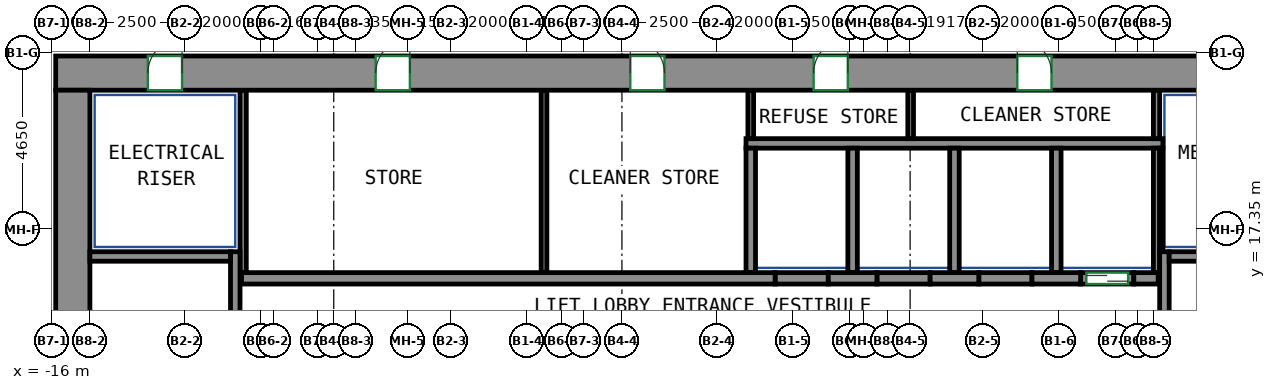
"""IFC4 building model, lengths in metres.
Left out: names, types, materials, properties, quantities, classifications, styles, units other than length and angle.
Written with IfcOpenShell. Run it as: python <this file> out.ifc"""

import sys

from ifc_helpers import new_model, si_unit, direction, frame, frame_2d, origin, place, context, subcontext, project, spatial, rectangle, extrude, source, transform, mapped, element, fill, save


model = new_model("IFC4")
c1 = context("Model", 3, precision=1e-05, world=origin(), true_north=direction((0.0, 1.0)))
c2 = subcontext(c1, "Body", "Model", "MODEL_VIEW")
j1 = project(units=[si_unit("LENGTHUNIT", "METRE"), si_unit("PLANEANGLEUNIT", "RADIAN")], contexts=[c1])
p1 = place(None, origin())
s1 = spatial("IfcSite", under=j1, at=p1, CompositionType="ELEMENT")
p2 = place(p1, origin())
s2 = spatial("IfcBuilding", under=s1, at=p2, CompositionType="ELEMENT")
p3 = place(p2, frame((0.0, 0.0, 178.7)))
s3 = spatial("IfcBuildingStorey", under=s2, at=p3, CompositionType="ELEMENT", Elevation=178.7)
m1 = source(origin(), c2, "Body", "SweptSolid", [
    extrude(rectangle(XDim=33.9, YDim=0.9, at=frame_2d((16.95, 0.0))), origin(), (0.0, 0.0, 1.0), 3.12),
])
p4 = place(p3, frame((-15.9, 21.45, 0.0), z_axis=(0.0, 0.0, 1.0), x_axis=(1.0, 0.0, 0.0)))
e1 = element("IfcWall", 1, at=p4, inside=s3, PredefinedType="SHEAR", context=c2, shape_type="MappedRepresentation", body=[
    mapped(m1, transform((0.0, 0.0, 0.0))),
])
p5 = place(p4, frame((8.42, 0.0, 0.0)))
e2 = element("IfcOpeningElement", 2, at=p5, cuts=e1, PredefinedType="OPENING", context=c2, shape_type="SweptSolid", body=[
    extrude(rectangle(XDim=0.9, YDim=2.1, at=frame_2d((0.45, 1.05))), frame((0.0, 0.46, 0.0), z_axis=(0.0, -1.0, 0.0), x_axis=(1.0, 0.0, 0.0)), (0.0, 0.0, 1.0), 0.92),
])
p6 = place(p4, frame((15.12, 0.0, 0.0)))
e3 = element("IfcOpeningElement", 3, at=p6, cuts=e1, PredefinedType="OPENING", context=c2, shape_type="SweptSolid", body=[
    extrude(rectangle(XDim=0.9, YDim=2.1, at=frame_2d((0.45, 1.05))), frame((0.0, 0.46, 0.0), z_axis=(0.0, -1.0, 0.0), x_axis=(1.0, 0.0, 0.0)), (0.0, 0.0, 1.0), 0.92),
])
p7 = place(p4, frame((19.944, 0.0, 0.0)))
e4 = element("IfcOpeningElement", 4, at=p7, cuts=e1, PredefinedType="OPENING", context=c2, shape_type="SweptSolid", body=[
    extrude(rectangle(XDim=0.9, YDim=2.1, at=frame_2d((0.45, 1.05))), frame((0.0, 0.46, 0.0), z_axis=(0.0, -1.0, 0.0), x_axis=(1.0, 0.0, 0.0)), (0.0, 0.0, 1.0), 0.92),
])
p8 = place(p4, frame((25.304, 0.0, 0.0)))
e5 = element("IfcOpeningElement", 5, at=p8, cuts=e1, PredefinedType="OPENING", context=c2, shape_type="SweptSolid", body=[
    extrude(rectangle(XDim=0.9, YDim=2.1, at=frame_2d((0.45, 1.05))), frame((0.0, 0.46, 0.0), z_axis=(0.0, -1.0, 0.0), x_axis=(1.0, 0.0, 0.0)), (0.0, 0.0, 1.0), 0.92),
])
p9 = place(p4, frame((2.425, 0.0, 0.0)))
e6 = element("IfcOpeningElement", 6, at=p9, cuts=e1, PredefinedType="OPENING", context=c2, shape_type="SweptSolid", body=[
    extrude(rectangle(XDim=0.9, YDim=2.1, at=frame_2d((0.45, 1.05))), frame((0.0, 0.46, 0.0), z_axis=(0.0, -1.0, 0.0), x_axis=(1.0, 0.0, 0.0)), (0.0, 0.0, 1.0), 0.92),
])
p10 = place(p4, frame((30.575, 0.0, 0.0)))
e7 = element("IfcOpeningElement", 7, at=p10, cuts=e1, PredefinedType="OPENING", context=c2, shape_type="SweptSolid", body=[
    extrude(rectangle(XDim=0.9, YDim=2.1, at=frame_2d((0.45, 1.05))), frame((0.0, 0.46, 0.0), z_axis=(0.0, -1.0, 0.0), x_axis=(1.0, 0.0, 0.0)), (0.0, 0.0, 1.0), 0.92),
])
m2 = source(origin(), c2, "Body", "SweptSolid", [
    extrude(rectangle(XDim=12.0, YDim=0.9, at=frame_2d((6.0, 0.0))), origin(), (0.0, 0.0, 1.0), 3.12),
])
p11 = place(p3, frame((-15.45, 9.0, 0.0), z_axis=(0.0, 0.0, 1.0), x_axis=(0.0, 1.0, 0.0)))
e8 = element("IfcWall", 8, at=p11, inside=s3, PredefinedType="SHEAR", context=c2, shape_type="MappedRepresentation", body=[
    mapped(m2, transform((0.0, 0.0, 0.0))),
])
m3 = source(origin(), c2, "Body", "SweptSolid", [
    extrude(rectangle(XDim=7.75, YDim=0.25, at=frame_2d((3.875, 0.0))), origin(), (0.0, 0.0, 1.0), 3.12),
])
p12 = place(p3, frame((-11.175, 9.0, 0.0), z_axis=(0.0, 0.0, 1.0), x_axis=(0.0, 1.0, 0.0)))
e9 = element("IfcWall", 9, at=p12, inside=s3, PredefinedType="SHEAR", context=c2, shape_type="MappedRepresentation", body=[
    mapped(m3, transform((0.0, 0.0, 0.0))),
])
m4 = source(origin(), c2, "Body", "SweptSolid", [
    extrude(rectangle(XDim=3.7, YDim=0.25, at=frame_2d((1.85, 0.0))), origin(), (0.0, 0.0, 1.0), 3.12),
])
p13 = place(p3, frame((-15.0, 16.625, 0.0), z_axis=(0.0, 0.0, 1.0), x_axis=(1.0, 0.0, 0.0)))
e10 = element("IfcWall", 10, at=p13, inside=s3, PredefinedType="SHEAR", context=c2, shape_type="MappedRepresentation", body=[
    mapped(m4, transform((0.0, 0.0, 0.0))),
])
p14 = place(p3, frame((13.275, 9.0, 0.0), z_axis=(0.0, 0.0, 1.0), x_axis=(0.0, 1.0, 0.0)))
e11 = element("IfcWall", 11, at=p14, inside=s3, PredefinedType="SHEAR", context=c2, shape_type="MappedRepresentation", body=[
    mapped(m3, transform((0.0, 0.0, 0.0))),
])
m5 = source(origin(), c2, "Body", "SweptSolid", [
    extrude(rectangle(XDim=3.7, YDim=0.25, at=frame_2d((1.85, 0.0))), origin(), (0.0, 0.0, 1.0), 3.12),
])
p15 = place(p3, frame((13.4, 16.625, 0.0), z_axis=(0.0, 0.0, 1.0), x_axis=(1.0, 0.0, 0.0)))
e12 = element("IfcWall", 12, at=p15, inside=s3, PredefinedType="SHEAR", context=c2, shape_type="MappedRepresentation", body=[
    mapped(m5, transform((0.0, 0.0, 0.0))),
])
m6 = source(origin(), c2, "Body", "SweptSolid", [
    extrude(rectangle(XDim=14.04, YDim=0.3, at=frame_2d((7.02, 0.0))), origin(), (0.0, 0.0, 1.0), 3.12),
])
p16 = place(p3, frame((-11.01, 16.05, 0.0), z_axis=(0.0, 0.0, 1.0), x_axis=(1.0, 0.0, 0.0)))
e13 = element("IfcWall", 13, at=p16, inside=s3, PredefinedType="SHEAR", context=c2, shape_type="MappedRepresentation", body=[
    mapped(m6, transform((0.0, 0.0, 0.0))),
])
m7 = source(origin(), c2, "Body", "SweptSolid", [
    extrude(rectangle(XDim=1.28, YDim=0.3, at=frame_2d((0.64, 0.0))), origin(), (0.0, 0.0, 1.0), 3.12),
])
p17 = place(p3, frame((4.43, 16.05, 0.0), z_axis=(0.0, 0.0, 1.0), x_axis=(1.0, 0.0, 0.0)))
e14 = element("IfcWall", 14, at=p17, inside=s3, PredefinedType="SHEAR", context=c2, shape_type="MappedRepresentation", body=[
    mapped(m7, transform((0.0, 0.0, 0.0))),
])
m8 = source(origin(), c2, "Body", "SweptSolid", [
    extrude(rectangle(XDim=1.28, YDim=0.3, at=frame_2d((0.64, 0.0))), origin(), (0.0, 0.0, 1.0), 3.12),
])
p18 = place(p3, frame((7.11, 16.05, 0.0), z_axis=(0.0, 0.0, 1.0), x_axis=(1.0, 0.0, 0.0)))
e15 = element("IfcWall", 15, at=p18, inside=s3, PredefinedType="SHEAR", context=c2, shape_type="MappedRepresentation", body=[
    mapped(m8, transform((0.0, 0.0, 0.0))),
])
p19 = place(p3, frame((9.79, 16.05, 0.0), z_axis=(0.0, 0.0, 1.0), x_axis=(1.0, 0.0, 0.0)))
e16 = element("IfcWall", 16, at=p19, inside=s3, PredefinedType="SHEAR", context=c2, shape_type="MappedRepresentation", body=[
    mapped(m7, transform((0.0, 0.0, 0.0))),
])
m9 = source(origin(), c2, "Body", "SweptSolid", [
    extrude(rectangle(XDim=0.64, YDim=0.3, at=frame_2d((0.32, 0.0))), origin(), (0.0, 0.0, 1.0), 3.12),
])
p20 = place(p3, frame((12.47, 16.05, 0.0), z_axis=(0.0, 0.0, 1.0), x_axis=(1.0, 0.0, 0.0)))
e17 = element("IfcWall", 17, at=p20, inside=s3, PredefinedType="SHEAR", context=c2, shape_type="MappedRepresentation", body=[
    mapped(m9, transform((0.0, 0.0, 0.0))),
])
m10 = source(origin(), c2, "Body", "SweptSolid", [
    extrude(rectangle(XDim=1.4, YDim=0.3, at=frame_2d((0.7, 0.0))), origin(), (0.0, 0.0, 1.0), 3.12),
])
p21 = place(p3, frame((11.07, 16.05, 0.0), z_axis=(0.0, 0.0, 1.0), x_axis=(1.0, 0.0, 0.0)))
e18 = element("IfcWall", 18, at=p21, inside=s3, PredefinedType="PARTITIONING", context=c2, shape_type="MappedRepresentation", body=[
    mapped(m10, transform((0.0, 0.0, 0.0))),
])
p22 = place(p21, frame((0.15, 0.0, 0.0)))
e19 = element("IfcOpeningElement", 19, at=p22, cuts=e18, PredefinedType="OPENING", context=c2, shape_type="SweptSolid", body=[
    extrude(rectangle(XDim=1.1, YDim=2.1, at=frame_2d((0.55, 1.05))), frame((0.0, 0.16, 0.0), z_axis=(0.0, -1.0, 0.0), x_axis=(1.0, 0.0, 0.0)), (0.0, 0.0, 1.0), 0.32),
])
p23 = place(p3, frame((3.03, 16.05, 0.0), z_axis=(0.0, 0.0, 1.0), x_axis=(1.0, 0.0, 0.0)))
e20 = element("IfcWall", 20, at=p23, inside=s3, PredefinedType="PARTITIONING", context=c2, shape_type="MappedRepresentation", body=[
    mapped(m10, transform((0.0, 0.0, 0.0))),
])
m11 = source(origin(), c2, "Body", "SweptSolid", [
    extrude(rectangle(XDim=1.4, YDim=0.3, at=frame_2d((0.7, 0.0))), origin(), (0.0, 0.0, 1.0), 3.12),
])
for number, where, z_axis, x_axis in (
    (21, (5.71, 16.05, 0.0), (0.0, 0.0, 1.0), (1.0, 0.0, 0.0)),
    (22, (8.39, 16.05, 0.0), (0.0, 0.0, 1.0), (1.0, 0.0, 0.0)),
):
    element("IfcWall", number, at=place(p3, frame(where, z_axis=z_axis, x_axis=x_axis)), inside=s3, PredefinedType="PARTITIONING", context=c2, shape_type="MappedRepresentation", body=[
        mapped(m11, transform((0.0, 0.0, 0.0))),
    ])
m12 = source(origin(), c2, "Body", "SweptSolid", [
    extrude(rectangle(XDim=10.97, YDim=0.25, at=frame_2d((5.485, 0.0))), origin(), (0.0, 0.0, 1.0), 3.12),
])
p24 = place(p3, frame((2.265, 19.6, 0.0), z_axis=(0.0, 0.0, 1.0), x_axis=(1.0, 0.0, 0.0)))
e23 = element("IfcWall", 23, at=p24, inside=s3, PredefinedType="PARTITIONING", context=c2, shape_type="MappedRepresentation", body=[
    mapped(m12, transform((0.0, 0.0, 0.0))),
])
m13 = source(origin(), c2, "Body", "SweptSolid", [
    extrude(rectangle(XDim=3.275, YDim=0.165, at=frame_2d((1.638, 0.0))), origin(), (0.0, 0.0, 1.0), 3.12),
])
p25 = place(p3, frame((13.067, 16.2, 0.0), z_axis=(0.0, 0.0, 1.0), x_axis=(0.0, 1.0, 0.0)))
e24 = element("IfcWall", 24, at=p25, inside=s3, PredefinedType="PARTITIONING", context=c2, shape_type="MappedRepresentation", body=[
    mapped(m13, transform((0.0, 0.0, 0.0))),
])
m14 = source(origin(), c2, "Body", "SweptSolid", [
    extrude(rectangle(XDim=1.275, YDim=0.165, at=frame_2d((0.637, 0.0))), origin(), (0.0, 0.0, 1.0), 3.12),
])
p26 = place(p3, frame((13.067, 19.725, 0.0), z_axis=(0.0, 0.0, 1.0), x_axis=(0.0, 1.0, 0.0)))
e25 = element("IfcWall", 25, at=p26, inside=s3, PredefinedType="PARTITIONING", context=c2, shape_type="MappedRepresentation", body=[
    mapped(m14, transform((0.0, 0.0, 0.0))),
])
m15 = source(origin(), c2, "Body", "SweptSolid", [
    extrude(rectangle(XDim=4.8, YDim=0.165, at=frame_2d((2.4, 0.0))), origin(), (0.0, 0.0, 1.0), 3.12),
])
p27 = place(p3, frame((-10.968, 16.2, 0.0), z_axis=(0.0, 0.0, 1.0), x_axis=(0.0, 1.0, 0.0)))
e26 = element("IfcWall", 26, at=p27, inside=s3, PredefinedType="PARTITIONING", context=c2, shape_type="MappedRepresentation", body=[
    mapped(m15, transform((0.0, 0.0, 0.0))),
])
m16 = source(origin(), c2, "Body", "SweptSolid", [
    extrude(rectangle(XDim=3.275, YDim=0.25, at=frame_2d((1.638, 0.0))), origin(), (0.0, 0.0, 1.0), 3.12),
])
p28 = place(p3, frame((10.43, 16.2, 0.0), z_axis=(0.0, 0.0, 1.0), x_axis=(0.0, 1.0, 0.0)))
e27 = element("IfcWall", 27, at=p28, inside=s3, PredefinedType="PARTITIONING", context=c2, shape_type="MappedRepresentation", body=[
    mapped(m16, transform((0.0, 0.0, 0.0))),
])
m17 = source(origin(), c2, "Body", "SweptSolid", [
    extrude(rectangle(XDim=2.725, YDim=0.085, at=frame_2d((1.363, 0.0))), origin(), (0.0, 0.0, 1.0), 3.12),
])
p29 = place(p3, frame((13.192, 16.75, 0.0), z_axis=(0.0, 0.0, 1.0), x_axis=(0.0, 1.0, 0.0)))
e28 = element("IfcWall", 28, at=p29, inside=s3, PredefinedType="PARTITIONING", context=c2, shape_type="MappedRepresentation", body=[
    mapped(m17, transform((0.0, 0.0, 0.0))),
])
for number, where, z_axis, x_axis in (
    (29, (2.39, 16.2, 0.0), (0.0, 0.0, 1.0), (0.0, 1.0, 0.0)),
    (30, (5.07, 16.2, 0.0), (0.0, 0.0, 1.0), (0.0, 1.0, 0.0)),
    (31, (7.75, 16.2, 0.0), (0.0, 0.0, 1.0), (0.0, 1.0, 0.0)),
):
    element("IfcWall", number, at=place(p3, frame(where, z_axis=z_axis, x_axis=x_axis)), inside=s3, PredefinedType="PARTITIONING", context=c2, shape_type="MappedRepresentation", body=[
        mapped(m16, transform((0.0, 0.0, 0.0))),
    ])
m18 = source(origin(), c2, "Body", "SweptSolid", [
    extrude(rectangle(XDim=4.8, YDim=0.15, at=frame_2d((2.4, 0.0))), origin(), (0.0, 0.0, 1.0), 3.12),
])
p30 = place(p3, frame((-3.05, 16.2, 0.0), z_axis=(0.0, 0.0, 1.0), x_axis=(0.0, 1.0, 0.0)))
e32 = element("IfcWall", 32, at=p30, inside=s3, PredefinedType="PARTITIONING", context=c2, shape_type="MappedRepresentation", body=[
    mapped(m18, transform((0.0, 0.0, 0.0))),
])
m19 = source(origin(), c2, "Body", "SweptSolid", [
    extrude(rectangle(XDim=1.275, YDim=0.15, at=frame_2d((0.637, 0.0))), origin(), (0.0, 0.0, 1.0), 3.12),
])
for number, where, z_axis, x_axis in (
    (33, (2.39, 19.725, 0.0), (0.0, 0.0, 1.0), (0.0, 1.0, 0.0)),
    (34, (6.598, 19.725, 0.0), (0.0, 0.0, 1.0), (0.0, 1.0, 0.0)),
):
    element("IfcWall", number, at=place(p3, frame(where, z_axis=z_axis, x_axis=x_axis)), inside=s3, PredefinedType="PARTITIONING", context=c2, shape_type="MappedRepresentation", body=[
        mapped(m19, transform((0.0, 0.0, 0.0))),
    ])
p31 = place(p22, origin())
e35 = element("IfcDoor", 35, at=p31, inside=s3, OperationType="DOUBLE_DOOR_SLIDING", PredefinedType="DOOR", context=c2, shape_type="SweptSolid", body=[
    extrude(rectangle(XDim=1.1, YDim=2.1, at=frame_2d((0.55, 1.05))), frame((0.0, 0.025, 0.0), z_axis=(0.0, -1.0, 0.0), x_axis=(1.0, 0.0, 0.0)), (0.0, 0.0, 1.0), 0.05),
])
fill(e19, e35)
p32 = place(p5, origin())
e36 = element("IfcDoor", 36, at=p32, inside=s3, OperationType="SINGLE_SWING_RIGHT", PredefinedType="DOOR", context=c2, shape_type="SweptSolid", body=[
    extrude(rectangle(XDim=0.9, YDim=2.1, at=frame_2d((0.45, 1.05))), frame((0.0, -0.305, 0.0), z_axis=(0.0, -1.0, 0.0), x_axis=(1.0, 0.0, 0.0)), (0.0, 0.0, 1.0), 0.05),
])
fill(e2, e36)
p33 = place(p6, origin())
e37 = element("IfcDoor", 37, at=p33, inside=s3, OperationType="SINGLE_SWING_LEFT", PredefinedType="DOOR", context=c2, shape_type="SweptSolid", body=[
    extrude(rectangle(XDim=0.9, YDim=2.1, at=frame_2d((0.45, 1.05))), frame((0.0, -0.305, 0.0), z_axis=(0.0, -1.0, 0.0), x_axis=(1.0, 0.0, 0.0)), (0.0, 0.0, 1.0), 0.05),
])
fill(e3, e37)
p34 = place(p7, origin())
e38 = element("IfcDoor", 38, at=p34, inside=s3, OperationType="SINGLE_SWING_RIGHT", PredefinedType="DOOR", context=c2, shape_type="SweptSolid", body=[
    extrude(rectangle(XDim=0.9, YDim=2.1, at=frame_2d((0.45, 1.05))), frame((0.0, -0.305, 0.0), z_axis=(0.0, -1.0, 0.0), x_axis=(1.0, 0.0, 0.0)), (0.0, 0.0, 1.0), 0.05),
])
fill(e4, e38)
p35 = place(p8, origin())
e39 = element("IfcDoor", 39, at=p35, inside=s3, OperationType="SINGLE_SWING_LEFT", PredefinedType="DOOR", context=c2, shape_type="SweptSolid", body=[
    extrude(rectangle(XDim=0.9, YDim=2.1, at=frame_2d((0.45, 1.05))), frame((0.0, -0.305, 0.0), z_axis=(0.0, -1.0, 0.0), x_axis=(1.0, 0.0, 0.0)), (0.0, 0.0, 1.0), 0.05),
])
fill(e5, e39)
p36 = place(p9, origin())
e40 = element("IfcDoor", 40, at=p36, inside=s3, OperationType="SINGLE_SWING_RIGHT", PredefinedType="DOOR", context=c2, shape_type="SweptSolid", body=[
    extrude(rectangle(XDim=0.9, YDim=2.1, at=frame_2d((0.45, 1.05))), frame((0.0, -0.305, 0.0), z_axis=(0.0, -1.0, 0.0), x_axis=(1.0, 0.0, 0.0)), (0.0, 0.0, 1.0), 0.05),
])
fill(e6, e40)
save(model, sys.argv[1])
